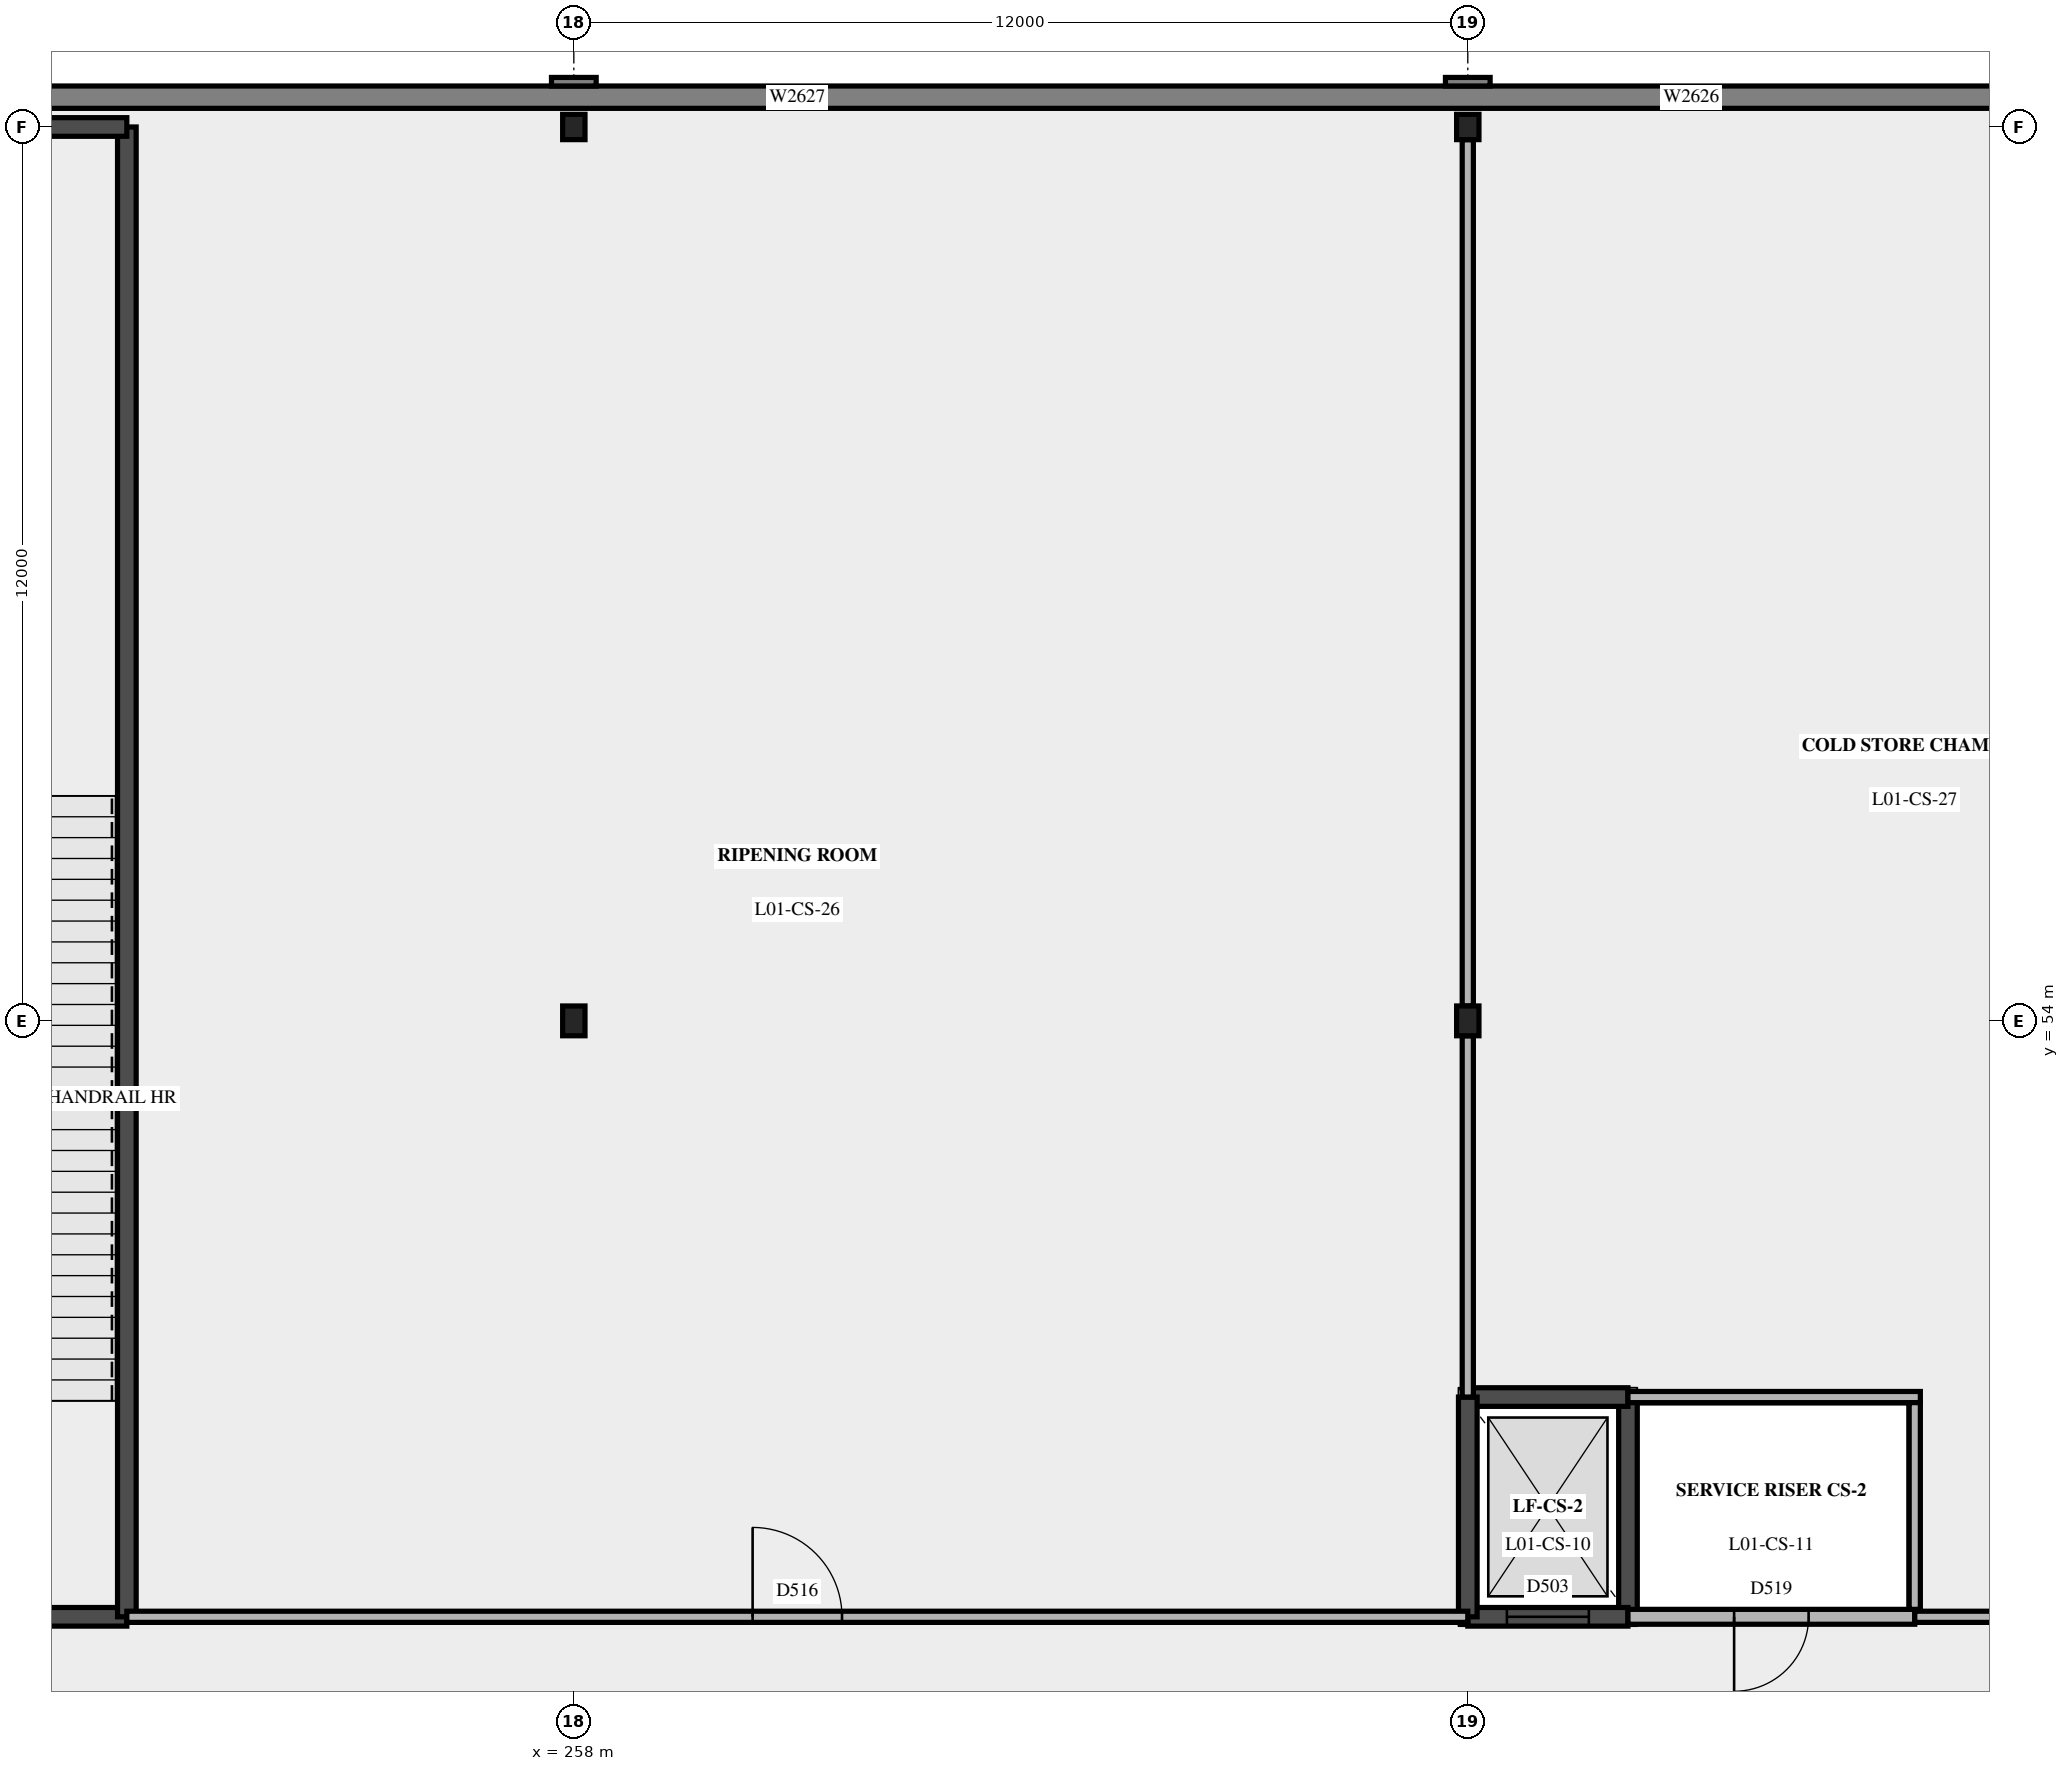
"""IFC4 building model, lengths in metres.
Left out: names, types, materials, properties, quantities, classifications, styles, units other than length and angle.
Written with IfcOpenShell. Run it as: python <this file> out.ifc"""

import sys

from ifc_helpers import new_model, si_unit, direction, frame, frame_2d, origin, origin_2d, place, context, subcontext, project, spatial, polyline, rectangle, i_section, outline, extrude, element, fill, save


model = new_model("IFC4")
c1 = context("Model", 3, precision=1e-05, world=origin(), true_north=direction((0.0, 1.0)))
c2 = subcontext(c1, "Body", "Model", "MODEL_VIEW")
j1 = project(units=[si_unit("LENGTHUNIT", "METRE"), si_unit("PLANEANGLEUNIT", "RADIAN")], contexts=[c1])
p1 = place(None, origin())
s1 = spatial("IfcSite", under=j1, at=p1, CompositionType="ELEMENT")
p2 = place(p1, origin())
s2 = spatial("IfcBuilding", under=s1, at=p2, CompositionType="ELEMENT")
p3 = place(p2, frame((0.0, 0.0, 5.4)))
s3 = spatial("IfcBuildingStorey", under=s2, at=p3, CompositionType="ELEMENT", Elevation=5.4)
p4 = place(p3, frame((258.0, 54.0, 0.0), z_axis=(0.0, 0.0, 1.0), x_axis=(1.0, 0.0, 0.0)))
e1 = element("IfcColumn", 1, at=p4, inside=s3, PredefinedType="COLUMN", context=c2, shape_type="SweptSolid", body=[
    extrude(i_section(OverallWidth=0.3, OverallDepth=0.4, WebThickness=0.013, FlangeThickness=0.024, at=origin_2d()), origin(), (0.0, 0.0, 1.0), 5.4),
])
p5 = place(p3, frame((258.0, 66.0, 0.0), z_axis=(0.0, 0.0, 1.0), x_axis=(1.0, 0.0, 0.0)))
e2 = element("IfcColumn", 2, at=p5, inside=s3, PredefinedType="COLUMN", context=c2, shape_type="SweptSolid", body=[
    extrude(i_section(OverallWidth=0.3, OverallDepth=0.34, WebThickness=0.012, FlangeThickness=0.021, at=origin_2d()), origin(), (0.0, 0.0, 1.0), 5.4),
])
p6 = place(p3, frame((270.0, 54.0, 0.0), z_axis=(0.0, 0.0, 1.0), x_axis=(1.0, 0.0, 0.0)))
e3 = element("IfcColumn", 3, at=p6, inside=s3, PredefinedType="COLUMN", context=c2, shape_type="SweptSolid", body=[
    extrude(i_section(OverallWidth=0.3, OverallDepth=0.4, WebThickness=0.013, FlangeThickness=0.024, at=origin_2d()), origin(), (0.0, 0.0, 1.0), 5.4),
])
p7 = place(p3, frame((270.0, 66.0, 0.0), z_axis=(0.0, 0.0, 1.0), x_axis=(1.0, 0.0, 0.0)))
e4 = element("IfcColumn", 4, at=p7, inside=s3, PredefinedType="COLUMN", context=c2, shape_type="SweptSolid", body=[
    extrude(i_section(OverallWidth=0.3, OverallDepth=0.34, WebThickness=0.012, FlangeThickness=0.021, at=origin_2d()), origin(), (0.0, 0.0, 1.0), 5.4),
])
p8 = place(p3, frame((246.0, 46.0, 0.0), z_axis=(0.0, 0.0, 1.0), x_axis=(1.0, 0.0, 0.0)))
e5 = element("IfcWall", 5, at=p8, inside=s3, PredefinedType="SHEAR", context=c2, shape_type="SweptSolid", body=[
    extrude(rectangle(XDim=6.0, YDim=0.25, at=frame_2d((3.0, 0.0))), origin(), (0.0, 0.0, 1.0), 5.4),
])
p9 = place(p8, frame((2.5, 0.0, 0.0)))
e6 = element("IfcOpeningElement", 6, at=p9, cuts=e5, PredefinedType="OPENING", context=c2, shape_type="SweptSolid", body=[
    extrude(rectangle(XDim=1.0, YDim=2.1, at=frame_2d((0.5, 1.05))), frame((0.0, 0.135, 0.0), z_axis=(0.0, -1.0, 0.0), x_axis=(1.0, 0.0, 0.0)), (0.0, 0.0, 1.0), 0.27),
])
p10 = place(p3, frame((252.0, 46.0, 0.0), z_axis=(0.0, 0.0, 1.0), x_axis=(0.0, 1.0, 0.0)))
e7 = element("IfcWall", 7, at=p10, inside=s3, PredefinedType="SHEAR", context=c2, shape_type="SweptSolid", body=[
    extrude(rectangle(XDim=20.0, YDim=0.25, at=frame_2d((10.0, 0.0))), origin(), (0.0, 0.0, 1.0), 5.4),
])
p11 = place(p3, frame((246.15, 66.0, 0.0), z_axis=(0.0, 0.0, 1.0), x_axis=(1.0, 0.0, 0.0)))
e8 = element("IfcWall", 8, at=p11, inside=s3, PredefinedType="SHEAR", context=c2, shape_type="SweptSolid", body=[
    extrude(rectangle(XDim=5.85, YDim=0.25, at=frame_2d((2.925, 0.0))), origin(), (0.0, 0.0, 1.0), 5.4),
])
p12 = place(p3, frame((282.25, 66.4, 0.0), z_axis=(0.0, 0.0, 1.0), x_axis=(-1.0, 0.0, 0.0)))
e9 = element("IfcWall", 9, at=p12, inside=s3, PredefinedType="SOLIDWALL", context=c2, shape_type="SweptSolid", body=[
    extrude(rectangle(XDim=84.5, YDim=0.3, at=frame_2d((42.25, 0.0))), origin(), (0.0, 0.0, 1.0), 5.4),
])
p13 = place(p12, frame((9.025, 0.0, 1.8)))
e10 = element("IfcOpeningElement", 10, at=p13, cuts=e9, PredefinedType="OPENING", context=c2, shape_type="SweptSolid", body=[
    extrude(rectangle(XDim=0.45, YDim=2.4, at=frame_2d((0.225, 1.2))), frame((0.0, 0.16, 0.0), z_axis=(0.0, -1.0, 0.0), x_axis=(1.0, 0.0, 0.0)), (0.0, 0.0, 1.0), 0.32),
])
p14 = place(p12, frame((21.025, 0.0, 1.8)))
e11 = element("IfcOpeningElement", 11, at=p14, cuts=e9, PredefinedType="OPENING", context=c2, shape_type="SweptSolid", body=[
    extrude(rectangle(XDim=0.45, YDim=2.4, at=frame_2d((0.225, 1.2))), frame((0.0, 0.16, 0.0), z_axis=(0.0, -1.0, 0.0), x_axis=(1.0, 0.0, 0.0)), (0.0, 0.0, 1.0), 0.32),
])
p15 = place(p12, frame((33.025, 0.0, 1.8)))
e12 = element("IfcOpeningElement", 12, at=p15, cuts=e9, PredefinedType="OPENING", context=c2, shape_type="SweptSolid", body=[
    extrude(rectangle(XDim=0.45, YDim=2.4, at=frame_2d((0.225, 1.2))), frame((0.0, 0.16, 0.0), z_axis=(0.0, -1.0, 0.0), x_axis=(1.0, 0.0, 0.0)), (0.0, 0.0, 1.0), 0.32),
])
p16 = place(p12, frame((45.025, 0.0, 1.8)))
e13 = element("IfcOpeningElement", 13, at=p16, cuts=e9, PredefinedType="OPENING", context=c2, shape_type="SweptSolid", body=[
    extrude(rectangle(XDim=0.45, YDim=2.4, at=frame_2d((0.225, 1.2))), frame((0.0, 0.16, 0.0), z_axis=(0.0, -1.0, 0.0), x_axis=(1.0, 0.0, 0.0)), (0.0, 0.0, 1.0), 0.32),
])
p17 = place(p12, frame((57.025, 0.0, 1.8)))
e14 = element("IfcOpeningElement", 14, at=p17, cuts=e9, PredefinedType="OPENING", context=c2, shape_type="SweptSolid", body=[
    extrude(rectangle(XDim=0.45, YDim=2.4, at=frame_2d((0.225, 1.2))), frame((0.0, 0.16, 0.0), z_axis=(0.0, -1.0, 0.0), x_axis=(1.0, 0.0, 0.0)), (0.0, 0.0, 1.0), 0.32),
])
p18 = place(p12, frame((69.025, 0.0, 1.8)))
e15 = element("IfcOpeningElement", 15, at=p18, cuts=e9, PredefinedType="OPENING", context=c2, shape_type="SweptSolid", body=[
    extrude(rectangle(XDim=0.45, YDim=2.4, at=frame_2d((0.225, 1.2))), frame((0.0, 0.16, 0.0), z_axis=(0.0, -1.0, 0.0), x_axis=(1.0, 0.0, 0.0)), (0.0, 0.0, 1.0), 0.32),
])
p19 = place(p12, frame((81.025, 0.0, 1.8)))
e16 = element("IfcOpeningElement", 16, at=p19, cuts=e9, PredefinedType="OPENING", context=c2, shape_type="SweptSolid", body=[
    extrude(rectangle(XDim=0.45, YDim=2.4, at=frame_2d((0.225, 1.2))), frame((0.0, 0.16, 0.0), z_axis=(0.0, -1.0, 0.0), x_axis=(1.0, 0.0, 0.0)), (0.0, 0.0, 1.0), 0.32),
])
for number, where, z_axis, x_axis in (
    (17, (270.3, 66.607, 0.0), (0.0, 0.0, 1.0), (-1.0, 0.0, 0.0)),
    (18, (258.3, 66.607, 0.0), (0.0, 0.0, 1.0), (-1.0, 0.0, 0.0)),
):
    element("IfcWall", number, at=place(p3, frame(where, z_axis=z_axis, x_axis=x_axis)), inside=s3, PredefinedType="SOLIDWALL", context=c2, shape_type="SweptSolid", body=[
        extrude(rectangle(XDim=0.6, YDim=0.115, at=frame_2d((0.3, 0.0))), origin(), (0.0, 0.0, 1.0), 5.4),
    ])
p20 = place(p3, frame((272.15, 46.0, 0.0), z_axis=(0.0, 0.0, 1.0), x_axis=(0.0, 1.0, 0.0)))
e19 = element("IfcWall", 19, at=p20, inside=s3, PredefinedType="SHEAR", context=c2, shape_type="SweptSolid", body=[
    extrude(rectangle(XDim=2.95, YDim=0.25, at=frame_2d((1.475, 0.0))), origin(), (0.0, 0.0, 1.0), 5.4),
])
p21 = place(p3, frame((272.15, 48.95, 0.0), z_axis=(0.0, 0.0, 1.0), x_axis=(-1.0, 0.0, 0.0)))
e20 = element("IfcWall", 20, at=p21, inside=s3, PredefinedType="SHEAR", context=c2, shape_type="SweptSolid", body=[
    extrude(rectangle(XDim=2.15, YDim=0.25, at=frame_2d((1.075, 0.0))), origin(), (0.0, 0.0, 1.0), 5.4),
])
p22 = place(p3, frame((270.0, 46.0, 0.0), z_axis=(0.0, 0.0, 1.0), x_axis=(1.0, 0.0, 0.0)))
e21 = element("IfcWall", 21, at=p22, inside=s3, PredefinedType="SHEAR", context=c2, shape_type="SweptSolid", body=[
    extrude(rectangle(XDim=2.15, YDim=0.25, at=frame_2d((1.075, 0.0))), origin(), (0.0, 0.0, 1.0), 5.4),
])
p23 = place(p22, frame((0.525, 0.0, 0.0)))
e22 = element("IfcOpeningElement", 22, at=p23, cuts=e21, PredefinedType="OPENING", context=c2, shape_type="SweptSolid", body=[
    extrude(rectangle(XDim=1.1, YDim=2.1, at=frame_2d((0.55, 1.05))), frame((0.0, 0.135, 0.0), z_axis=(0.0, -1.0, 0.0), x_axis=(1.0, 0.0, 0.0)), (0.0, 0.0, 1.0), 0.27),
])
p24 = place(p3, frame((270.0, 48.95, 0.0), z_axis=(0.0, 0.0, 1.0), x_axis=(0.0, -1.0, 0.0)))
e23 = element("IfcWall", 23, at=p24, inside=s3, PredefinedType="SHEAR", context=c2, shape_type="SweptSolid", body=[
    extrude(rectangle(XDim=2.95, YDim=0.25, at=frame_2d((1.475, 0.0))), origin(), (0.0, 0.0, 1.0), 5.4),
])
p25 = place(p3, frame((252.0, 46.0, 0.0), z_axis=(0.0, 0.0, 1.0), x_axis=(1.0, 0.0, 0.0)))
e24 = element("IfcWall", 24, at=p25, inside=s3, PredefinedType="PARTITIONING", context=c2, shape_type="SweptSolid", body=[
    extrude(outline(polyline([(0.0, 0.0), (18.0, 0.0), (18.0, 5.15), (15.705, 5.15), (15.7, 4.63), (15.5, 4.63), (15.495, 5.15), (13.305, 5.15), (13.3, 4.63), (13.1, 4.63), (13.095, 5.15), (10.905, 5.15), (10.9, 4.63), (10.7, 4.63), (10.695, 5.15), (8.505, 5.15), (8.5, 4.63), (8.3, 4.63), (8.295, 5.15), (6.1, 5.15), (6.095, 4.68), (5.905, 4.68), (5.9, 5.15), (3.705, 5.15), (3.7, 4.63), (3.5, 4.63), (3.495, 5.15), (1.305, 5.15), (1.3, 4.63), (1.1, 4.63), (1.095, 5.15), (0.0, 5.15), (0.0, 0.0)])), frame((0.0, 0.075, 0.0), z_axis=(0.0, -1.0, 0.0), x_axis=(1.0, 0.0, 0.0)), (0.0, 0.0, 1.0), 0.15),
])
p26 = place(p25, frame((8.4, 0.0, 0.0)))
e25 = element("IfcOpeningElement", 25, at=p26, cuts=e24, PredefinedType="OPENING", context=c2, shape_type="SweptSolid", body=[
    extrude(rectangle(XDim=1.2, YDim=2.4, at=frame_2d((0.6, 1.2))), frame((0.0, 0.085, 0.0), z_axis=(0.0, -1.0, 0.0), x_axis=(1.0, 0.0, 0.0)), (0.0, 0.0, 1.0), 0.17),
])
p27 = place(p3, frame((272.15, 46.0, 0.0), z_axis=(0.0, 0.0, 1.0), x_axis=(1.0, 0.0, 0.0)))
e26 = element("IfcWall", 26, at=p27, inside=s3, PredefinedType="PARTITIONING", context=c2, shape_type="SweptSolid", body=[
    extrude(outline(polyline([(0.0, 0.0), (3.85, 0.0), (3.85, 5.15), (2.755, 5.15), (2.75, 4.63), (2.55, 4.63), (2.545, 5.15), (0.355, 5.15), (0.35, 4.63), (0.15, 4.63), (0.145, 5.15), (0.0, 5.15), (0.0, 0.0)])), frame((0.0, 0.1, 0.0), z_axis=(0.0, -1.0, 0.0), x_axis=(1.0, 0.0, 0.0)), (0.0, 0.0, 1.0), 0.2),
])
p28 = place(p27, frame((1.425, 0.0, 0.0)))
e27 = element("IfcOpeningElement", 27, at=p28, cuts=e26, PredefinedType="OPENING", context=c2, shape_type="SweptSolid", body=[
    extrude(rectangle(XDim=1.0, YDim=2.1, at=frame_2d((0.5, 1.05))), frame((0.0, 0.11, 0.0), z_axis=(0.0, -1.0, 0.0), x_axis=(1.0, 0.0, 0.0)), (0.0, 0.0, 1.0), 0.22),
])
p29 = place(p3, frame((276.0, 46.0, 0.0), z_axis=(0.0, 0.0, 1.0), x_axis=(1.0, 0.0, 0.0)))
e28 = element("IfcWall", 28, at=p29, inside=s3, PredefinedType="PARTITIONING", context=c2, shape_type="SweptSolid", body=[
    extrude(outline(polyline([(0.0, 0.0), (6.0, 0.0), (6.0, 4.68), (5.905, 4.68), (5.9, 5.15), (3.705, 5.15), (3.7, 4.63), (3.5, 4.63), (3.495, 5.15), (1.305, 5.15), (1.3, 4.63), (1.1, 4.63), (1.095, 5.15), (0.0, 5.15), (0.0, 0.0)])), frame((0.0, 0.075, 0.0), z_axis=(0.0, -1.0, 0.0), x_axis=(1.0, 0.0, 0.0)), (0.0, 0.0, 1.0), 0.15),
])
p30 = place(p29, frame((2.4, 0.0, 0.0)))
e29 = element("IfcOpeningElement", 29, at=p30, cuts=e28, PredefinedType="OPENING", context=c2, shape_type="SweptSolid", body=[
    extrude(rectangle(XDim=1.2, YDim=2.4, at=frame_2d((0.6, 1.2))), frame((0.0, 0.085, 0.0), z_axis=(0.0, -1.0, 0.0), x_axis=(1.0, 0.0, 0.0)), (0.0, 0.0, 1.0), 0.17),
])
p31 = place(p3, frame((272.15, 48.95, 0.0), z_axis=(0.0, 0.0, 1.0), x_axis=(1.0, 0.0, 0.0)))
e30 = element("IfcWall", 30, at=p31, inside=s3, PredefinedType="PARTITIONING", context=c2, shape_type="SweptSolid", body=[
    extrude(outline(polyline([(0.0, 0.0), (3.925, 0.0), (3.925, 5.15), (2.755, 5.15), (2.75, 4.63), (2.55, 4.63), (2.545, 5.15), (0.355, 5.15), (0.35, 4.63), (0.15, 4.63), (0.145, 5.15), (0.0, 5.15), (0.0, 0.0)])), frame((0.0, 0.075, 0.0), z_axis=(0.0, -1.0, 0.0), x_axis=(1.0, 0.0, 0.0)), (0.0, 0.0, 1.0), 0.15),
])
p32 = place(p3, frame((270.0, 48.95, 0.0), z_axis=(0.0, 0.0, 1.0), x_axis=(0.0, 1.0, 0.0)))
e31 = element("IfcWall", 31, at=p32, inside=s3, PredefinedType="PARTITIONING", context=c2, shape_type="SweptSolid", body=[
    extrude(rectangle(XDim=4.85, YDim=0.15, at=frame_2d((2.425, 0.0))), origin(), (0.0, 0.0, 1.0), 4.68),
])
p33 = place(p3, frame((270.0, 54.2, 0.0), z_axis=(0.0, 0.0, 1.0), x_axis=(0.0, 1.0, 0.0)))
e32 = element("IfcWall", 32, at=p33, inside=s3, PredefinedType="PARTITIONING", context=c2, shape_type="SweptSolid", body=[
    extrude(rectangle(XDim=11.63, YDim=0.15, at=frame_2d((5.815, 0.0))), origin(), (0.0, 0.0, 1.0), 4.68),
])
p34 = place(p3, frame((276.0, 46.1, 0.0), z_axis=(0.0, 0.0, 1.0), x_axis=(0.0, 1.0, 0.0)))
e33 = element("IfcWall", 33, at=p34, inside=s3, PredefinedType="PARTITIONING", context=c2, shape_type="SweptSolid", body=[
    extrude(rectangle(XDim=2.775, YDim=0.15, at=frame_2d((1.387, 0.0))), origin(), (0.0, 0.0, 1.0), 5.15),
])
p35 = place(p13, origin())
e34 = element("IfcWindow", 34, at=p35, inside=s3, PartitioningType="SINGLE_PANEL", PredefinedType="WINDOW", context=c2, shape_type="SweptSolid", body=[
    extrude(rectangle(XDim=0.45, YDim=2.4, at=frame_2d((0.225, 1.2))), frame((0.0, 0.03, 0.0), z_axis=(0.0, -1.0, 0.0), x_axis=(1.0, 0.0, 0.0)), (0.0, 0.0, 1.0), 0.06),
])
fill(e10, e34)
p36 = place(p14, origin())
e35 = element("IfcWindow", 35, at=p36, inside=s3, PartitioningType="SINGLE_PANEL", PredefinedType="WINDOW", context=c2, shape_type="SweptSolid", body=[
    extrude(rectangle(XDim=0.45, YDim=2.4, at=frame_2d((0.225, 1.2))), frame((0.0, 0.03, 0.0), z_axis=(0.0, -1.0, 0.0), x_axis=(1.0, 0.0, 0.0)), (0.0, 0.0, 1.0), 0.06),
])
fill(e11, e35)
p37 = place(p23, origin())
e36 = element("IfcDoor", 36, at=p37, inside=s3, OperationType="SLIDING_TO_LEFT", PredefinedType="DOOR", context=c2, shape_type="SweptSolid", body=[
    extrude(rectangle(XDim=1.1, YDim=2.1, at=frame_2d((0.55, 1.05))), frame((0.0, 0.025, 0.0), z_axis=(0.0, -1.0, 0.0), x_axis=(1.0, 0.0, 0.0)), (0.0, 0.0, 1.0), 0.05),
])
fill(e22, e36)
p38 = place(p26, origin())
e37 = element("IfcDoor", 37, at=p38, inside=s3, OperationType="SINGLE_SWING_LEFT", PredefinedType="DOOR", context=c2, shape_type="SweptSolid", body=[
    extrude(rectangle(XDim=1.2, YDim=2.4, at=frame_2d((0.6, 1.2))), frame((0.0, 0.025, 0.0), z_axis=(0.0, -1.0, 0.0), x_axis=(1.0, 0.0, 0.0)), (0.0, 0.0, 1.0), 0.05),
])
fill(e25, e37)
p39 = place(p28, origin())
e38 = element("IfcDoor", 38, at=p39, inside=s3, OperationType="SINGLE_SWING_RIGHT", PredefinedType="DOOR", context=c2, shape_type="SweptSolid", body=[
    extrude(rectangle(XDim=1.0, YDim=2.1, at=frame_2d((0.5, 1.05))), frame((0.0, 0.025, 0.0), z_axis=(0.0, -1.0, 0.0), x_axis=(1.0, 0.0, 0.0)), (0.0, 0.0, 1.0), 0.05),
])
fill(e27, e38)
save(model, sys.argv[1])
